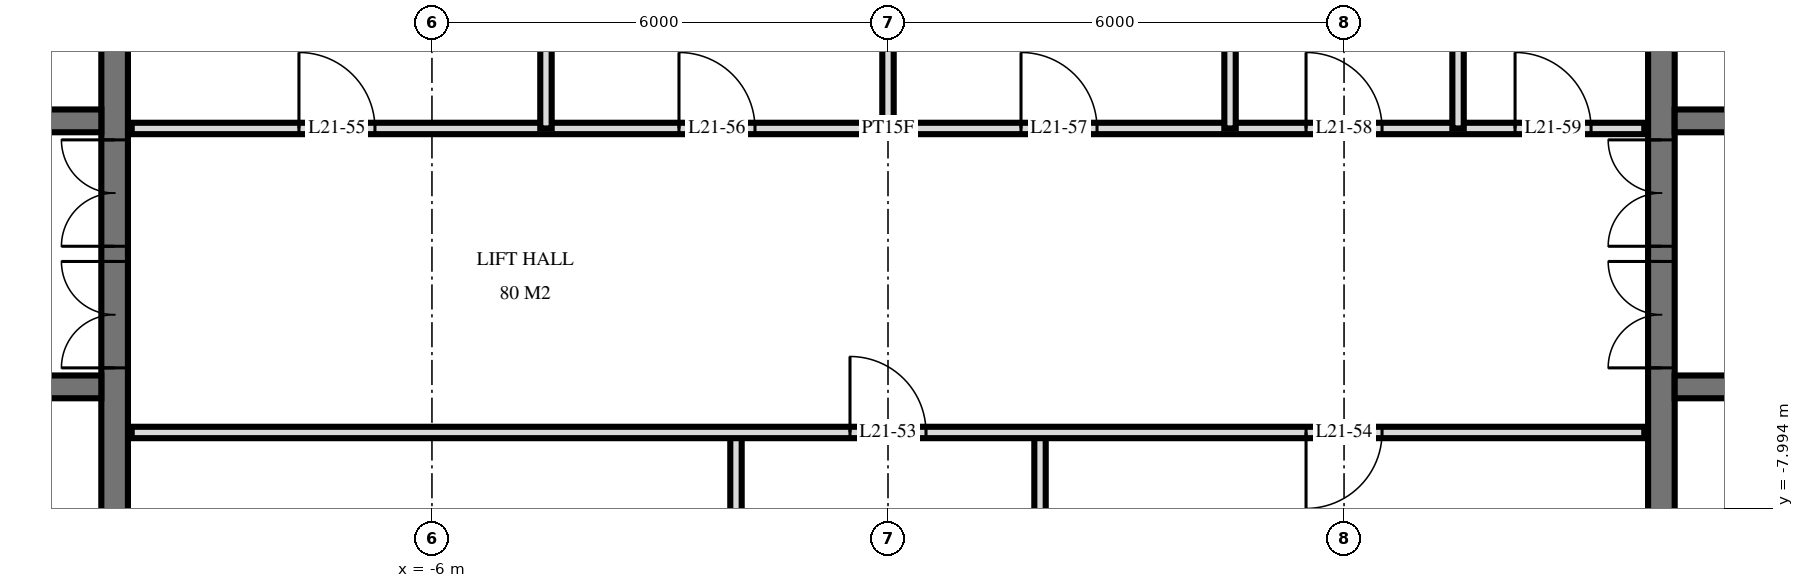
"""IFC4 building model, lengths in metres.
Left out: names, types, materials, properties, quantities, classifications, styles, units other than length and angle.
Written with IfcOpenShell. Run it as: python <this file> out.ifc"""

import sys

from ifc_helpers import new_model, si_unit, direction, frame, frame_2d, origin, place, context, subcontext, project, spatial, rectangle, extrude, element, fill, save


model = new_model("IFC4")
c1 = context("Model", 3, precision=1e-05, world=origin(), true_north=direction((0.0, 1.0)))
c2 = subcontext(c1, "Body", "Model", "MODEL_VIEW")
j1 = project(units=[si_unit("LENGTHUNIT", "METRE"), si_unit("PLANEANGLEUNIT", "RADIAN")], contexts=[c1])
p1 = place(None, origin())
s1 = spatial("IfcSite", under=j1, at=p1, CompositionType="ELEMENT")
p2 = place(p1, origin())
s2 = spatial("IfcBuilding", under=s1, at=p2, CompositionType="ELEMENT")
p3 = place(p2, frame((0.0, 0.0, 85.2)))
s3 = spatial("IfcBuildingStorey", under=s2, at=p3, CompositionType="ELEMENT", Elevation=85.2)
p4 = place(p3, frame((-10.175, -14.55, 0.0), z_axis=(0.0, 0.0, 1.0), x_axis=(0.0, 1.0, 0.0)))
e1 = element("IfcWall", 1, at=p4, inside=s3, PredefinedType="SHEAR", context=c2, shape_type="SweptSolid", body=[
    extrude(rectangle(XDim=14.1, YDim=0.35, at=frame_2d((7.05, 0.0))), origin(), (0.0, 0.0, 1.0), 3.6),
])
p5 = place(p4, frame((8.4, 0.0, 0.0)))
e2 = element("IfcOpeningElement", 2, at=p5, cuts=e1, PredefinedType="OPENING", context=c2, shape_type="SweptSolid", body=[
    extrude(rectangle(XDim=1.4, YDim=2.4, at=frame_2d((0.7, 1.2))), frame((0.0, 0.185, 0.0), z_axis=(0.0, -1.0, 0.0), x_axis=(1.0, 0.0, 0.0)), (0.0, 0.0, 1.0), 0.37),
])
p6 = place(p4, frame((10.0, 0.0, 0.0)))
e3 = element("IfcOpeningElement", 3, at=p6, cuts=e1, PredefinedType="OPENING", context=c2, shape_type="SweptSolid", body=[
    extrude(rectangle(XDim=1.4, YDim=2.4, at=frame_2d((0.7, 1.2))), frame((0.0, 0.185, 0.0), z_axis=(0.0, -1.0, 0.0), x_axis=(1.0, 0.0, 0.0)), (0.0, 0.0, 1.0), 0.37),
])
p7 = place(p4, frame((4.0, 0.0, 0.0)))
e4 = element("IfcOpeningElement", 4, at=p7, cuts=e1, PredefinedType="OPENING", context=c2, shape_type="SweptSolid", body=[
    extrude(rectangle(XDim=1.2, YDim=2.1, at=frame_2d((0.6, 1.05))), frame((0.0, 0.185, 0.0), z_axis=(0.0, -1.0, 0.0), x_axis=(1.0, 0.0, 0.0)), (0.0, 0.0, 1.0), 0.37),
])
p8 = place(p3, frame((-29.05, -2.9, 0.0), z_axis=(0.0, 0.0, 1.0), x_axis=(1.0, 0.0, 0.0)))
e5 = element("IfcWall", 5, at=p8, inside=s3, PredefinedType="SHEAR", context=c2, shape_type="SweptSolid", body=[
    extrude(rectangle(XDim=18.7, YDim=0.3, at=frame_2d((9.35, 0.0))), origin(), (0.0, 0.0, 1.0), 3.6),
])
p9 = place(p8, frame((2.95, 0.0, 0.0)))
e6 = element("IfcOpeningElement", 6, at=p9, cuts=e5, PredefinedType="OPENING", context=c2, shape_type="SweptSolid", body=[
    extrude(rectangle(XDim=1.1, YDim=2.1, at=frame_2d((0.55, 1.05))), frame((0.0, 0.16, 0.0), z_axis=(0.0, -1.0, 0.0), x_axis=(1.0, 0.0, 0.0)), (0.0, 0.0, 1.0), 0.32),
])
p10 = place(p8, frame((0.55, 0.0, 0.0)))
e7 = element("IfcOpeningElement", 7, at=p10, cuts=e5, PredefinedType="OPENING", context=c2, shape_type="SweptSolid", body=[
    extrude(rectangle(XDim=1.1, YDim=2.1, at=frame_2d((0.55, 1.05))), frame((0.0, 0.16, 0.0), z_axis=(0.0, -1.0, 0.0), x_axis=(1.0, 0.0, 0.0)), (0.0, 0.0, 1.0), 0.32),
])
p11 = place(p8, frame((10.9, 0.0, 0.0)))
e8 = element("IfcOpeningElement", 8, at=p11, cuts=e5, PredefinedType="OPENING", context=c2, shape_type="SweptSolid", body=[
    extrude(rectangle(XDim=0.9, YDim=2.1, at=frame_2d((0.45, 1.05))), frame((0.0, 0.16, 0.0), z_axis=(0.0, -1.0, 0.0), x_axis=(1.0, 0.0, 0.0)), (0.0, 0.0, 1.0), 0.32),
])
p12 = place(p8, frame((16.85, 0.0, 0.0)))
e9 = element("IfcOpeningElement", 9, at=p12, cuts=e5, PredefinedType="OPENING", context=c2, shape_type="SweptSolid", body=[
    extrude(rectangle(XDim=1.0, YDim=2.1, at=frame_2d((0.5, 1.05))), frame((0.0, 0.16, 0.0), z_axis=(0.0, -1.0, 0.0), x_axis=(1.0, 0.0, 0.0)), (0.0, 0.0, 1.0), 0.32),
])
p13 = place(p8, frame((14.312, 0.0, 0.0)))
e10 = element("IfcOpeningElement", 10, at=p13, cuts=e5, PredefinedType="OPENING", context=c2, shape_type="SweptSolid", body=[
    extrude(rectangle(XDim=1.0, YDim=2.1, at=frame_2d((0.5, 1.05))), frame((0.0, 0.16, 0.0), z_axis=(0.0, -1.0, 0.0), x_axis=(1.0, 0.0, 0.0)), (0.0, 0.0, 1.0), 0.32),
])
p14 = place(p8, frame((12.887, 0.0, 0.0)))
e11 = element("IfcOpeningElement", 11, at=p14, cuts=e5, PredefinedType="OPENING", context=c2, shape_type="SweptSolid", body=[
    extrude(rectangle(XDim=1.0, YDim=2.1, at=frame_2d((0.5, 1.05))), frame((0.0, 0.16, 0.0), z_axis=(0.0, -1.0, 0.0), x_axis=(1.0, 0.0, 0.0)), (0.0, 0.0, 1.0), 0.32),
])
p15 = place(p8, frame((5.6, 0.0, 0.0)))
e12 = element("IfcOpeningElement", 12, at=p15, cuts=e5, PredefinedType="OPENING", context=c2, shape_type="SweptSolid", body=[
    extrude(rectangle(XDim=1.0, YDim=2.1, at=frame_2d((0.5, 1.05))), frame((0.0, 0.16, 0.0), z_axis=(0.0, -1.0, 0.0), x_axis=(1.0, 0.0, 0.0)), (0.0, 0.0, 1.0), 0.32),
])
p16 = place(p3, frame((-29.05, -6.4, 0.0), z_axis=(0.0, 0.0, 1.0), x_axis=(1.0, 0.0, 0.0)))
e13 = element("IfcWall", 13, at=p16, inside=s3, PredefinedType="SHEAR", context=c2, shape_type="SweptSolid", body=[
    extrude(rectangle(XDim=18.7, YDim=0.3, at=frame_2d((9.35, 0.0))), origin(), (0.0, 0.0, 1.0), 3.6),
])
p17 = place(p16, frame((2.95, 0.0, 0.0)))
e14 = element("IfcOpeningElement", 14, at=p17, cuts=e13, PredefinedType="OPENING", context=c2, shape_type="SweptSolid", body=[
    extrude(rectangle(XDim=1.1, YDim=2.1, at=frame_2d((0.55, 1.05))), frame((0.0, 0.16, 0.0), z_axis=(0.0, -1.0, 0.0), x_axis=(1.0, 0.0, 0.0)), (0.0, 0.0, 1.0), 0.32),
])
p18 = place(p16, frame((0.55, 0.0, 0.0)))
e15 = element("IfcOpeningElement", 15, at=p18, cuts=e13, PredefinedType="OPENING", context=c2, shape_type="SweptSolid", body=[
    extrude(rectangle(XDim=1.1, YDim=2.1, at=frame_2d((0.55, 1.05))), frame((0.0, 0.16, 0.0), z_axis=(0.0, -1.0, 0.0), x_axis=(1.0, 0.0, 0.0)), (0.0, 0.0, 1.0), 0.32),
])
p19 = place(p16, frame((10.8, 0.0, 0.0)))
e16 = element("IfcOpeningElement", 16, at=p19, cuts=e13, PredefinedType="OPENING", context=c2, shape_type="SweptSolid", body=[
    extrude(rectangle(XDim=1.1, YDim=2.1, at=frame_2d((0.55, 1.05))), frame((0.0, 0.16, 0.0), z_axis=(0.0, -1.0, 0.0), x_axis=(1.0, 0.0, 0.0)), (0.0, 0.0, 1.0), 0.32),
])
p20 = place(p16, frame((5.6, 0.0, 0.0)))
e17 = element("IfcOpeningElement", 17, at=p20, cuts=e13, PredefinedType="OPENING", context=c2, shape_type="SweptSolid", body=[
    extrude(rectangle(XDim=1.0, YDim=2.1, at=frame_2d((0.5, 1.05))), frame((0.0, 0.16, 0.0), z_axis=(0.0, -1.0, 0.0), x_axis=(1.0, 0.0, 0.0)), (0.0, 0.0, 1.0), 0.32),
])
p21 = place(p3, frame((10.175, -14.55, 0.0), z_axis=(0.0, 0.0, 1.0), x_axis=(0.0, 1.0, 0.0)))
e18 = element("IfcWall", 18, at=p21, inside=s3, PredefinedType="SHEAR", context=c2, shape_type="SweptSolid", body=[
    extrude(rectangle(XDim=14.1, YDim=0.35, at=frame_2d((7.05, 0.0))), origin(), (0.0, 0.0, 1.0), 3.6),
])
p22 = place(p21, frame((8.4, 0.0, 0.0)))
e19 = element("IfcOpeningElement", 19, at=p22, cuts=e18, PredefinedType="OPENING", context=c2, shape_type="SweptSolid", body=[
    extrude(rectangle(XDim=1.4, YDim=2.4, at=frame_2d((0.7, 1.2))), frame((0.0, 0.185, 0.0), z_axis=(0.0, -1.0, 0.0), x_axis=(1.0, 0.0, 0.0)), (0.0, 0.0, 1.0), 0.37),
])
p23 = place(p21, frame((10.0, 0.0, 0.0)))
e20 = element("IfcOpeningElement", 20, at=p23, cuts=e18, PredefinedType="OPENING", context=c2, shape_type="SweptSolid", body=[
    extrude(rectangle(XDim=1.4, YDim=2.4, at=frame_2d((0.7, 1.2))), frame((0.0, 0.185, 0.0), z_axis=(0.0, -1.0, 0.0), x_axis=(1.0, 0.0, 0.0)), (0.0, 0.0, 1.0), 0.37),
])
p24 = place(p21, frame((4.0, 0.0, 0.0)))
e21 = element("IfcOpeningElement", 21, at=p24, cuts=e18, PredefinedType="OPENING", context=c2, shape_type="SweptSolid", body=[
    extrude(rectangle(XDim=1.2, YDim=2.1, at=frame_2d((0.6, 1.05))), frame((0.0, 0.185, 0.0), z_axis=(0.0, -1.0, 0.0), x_axis=(1.0, 0.0, 0.0)), (0.0, 0.0, 1.0), 0.37),
])
p25 = place(p3, frame((10.35, -2.9, 0.0), z_axis=(0.0, 0.0, 1.0), x_axis=(1.0, 0.0, 0.0)))
e22 = element("IfcWall", 22, at=p25, inside=s3, PredefinedType="SHEAR", context=c2, shape_type="SweptSolid", body=[
    extrude(rectangle(XDim=18.7, YDim=0.3, at=frame_2d((9.35, 0.0))), origin(), (0.0, 0.0, 1.0), 3.6),
])
p26 = place(p25, frame((14.65, 0.0, 0.0)))
e23 = element("IfcOpeningElement", 23, at=p26, cuts=e22, PredefinedType="OPENING", context=c2, shape_type="SweptSolid", body=[
    extrude(rectangle(XDim=1.1, YDim=2.1, at=frame_2d((0.55, 1.05))), frame((0.0, 0.16, 0.0), z_axis=(0.0, -1.0, 0.0), x_axis=(1.0, 0.0, 0.0)), (0.0, 0.0, 1.0), 0.32),
])
p27 = place(p25, frame((17.05, 0.0, 0.0)))
e24 = element("IfcOpeningElement", 24, at=p27, cuts=e22, PredefinedType="OPENING", context=c2, shape_type="SweptSolid", body=[
    extrude(rectangle(XDim=1.1, YDim=2.1, at=frame_2d((0.55, 1.05))), frame((0.0, 0.16, 0.0), z_axis=(0.0, -1.0, 0.0), x_axis=(1.0, 0.0, 0.0)), (0.0, 0.0, 1.0), 0.32),
])
p28 = place(p25, frame((6.9, 0.0, 0.0)))
e25 = element("IfcOpeningElement", 25, at=p28, cuts=e22, PredefinedType="OPENING", context=c2, shape_type="SweptSolid", body=[
    extrude(rectangle(XDim=0.9, YDim=2.1, at=frame_2d((0.45, 1.05))), frame((0.0, 0.16, 0.0), z_axis=(0.0, -1.0, 0.0), x_axis=(1.0, 0.0, 0.0)), (0.0, 0.0, 1.0), 0.32),
])
p29 = place(p25, frame((0.85, 0.0, 0.0)))
e26 = element("IfcOpeningElement", 26, at=p29, cuts=e22, PredefinedType="OPENING", context=c2, shape_type="SweptSolid", body=[
    extrude(rectangle(XDim=1.0, YDim=2.1, at=frame_2d((0.5, 1.05))), frame((0.0, 0.16, 0.0), z_axis=(0.0, -1.0, 0.0), x_axis=(1.0, 0.0, 0.0)), (0.0, 0.0, 1.0), 0.32),
])
p30 = place(p25, frame((3.387, 0.0, 0.0)))
e27 = element("IfcOpeningElement", 27, at=p30, cuts=e22, PredefinedType="OPENING", context=c2, shape_type="SweptSolid", body=[
    extrude(rectangle(XDim=1.0, YDim=2.1, at=frame_2d((0.5, 1.05))), frame((0.0, 0.16, 0.0), z_axis=(0.0, -1.0, 0.0), x_axis=(1.0, 0.0, 0.0)), (0.0, 0.0, 1.0), 0.32),
])
p31 = place(p25, frame((4.812, 0.0, 0.0)))
e28 = element("IfcOpeningElement", 28, at=p31, cuts=e22, PredefinedType="OPENING", context=c2, shape_type="SweptSolid", body=[
    extrude(rectangle(XDim=1.0, YDim=2.1, at=frame_2d((0.5, 1.05))), frame((0.0, 0.16, 0.0), z_axis=(0.0, -1.0, 0.0), x_axis=(1.0, 0.0, 0.0)), (0.0, 0.0, 1.0), 0.32),
])
p32 = place(p25, frame((12.1, 0.0, 0.0)))
e29 = element("IfcOpeningElement", 29, at=p32, cuts=e22, PredefinedType="OPENING", context=c2, shape_type="SweptSolid", body=[
    extrude(rectangle(XDim=1.0, YDim=2.1, at=frame_2d((0.5, 1.05))), frame((0.0, 0.16, 0.0), z_axis=(0.0, -1.0, 0.0), x_axis=(1.0, 0.0, 0.0)), (0.0, 0.0, 1.0), 0.32),
])
p33 = place(p3, frame((10.35, -6.4, 0.0), z_axis=(0.0, 0.0, 1.0), x_axis=(1.0, 0.0, 0.0)))
e30 = element("IfcWall", 30, at=p33, inside=s3, PredefinedType="SHEAR", context=c2, shape_type="SweptSolid", body=[
    extrude(rectangle(XDim=18.7, YDim=0.3, at=frame_2d((9.35, 0.0))), origin(), (0.0, 0.0, 1.0), 3.6),
])
p34 = place(p33, frame((14.65, 0.0, 0.0)))
e31 = element("IfcOpeningElement", 31, at=p34, cuts=e30, PredefinedType="OPENING", context=c2, shape_type="SweptSolid", body=[
    extrude(rectangle(XDim=1.1, YDim=2.1, at=frame_2d((0.55, 1.05))), frame((0.0, 0.16, 0.0), z_axis=(0.0, -1.0, 0.0), x_axis=(1.0, 0.0, 0.0)), (0.0, 0.0, 1.0), 0.32),
])
p35 = place(p33, frame((17.05, 0.0, 0.0)))
e32 = element("IfcOpeningElement", 32, at=p35, cuts=e30, PredefinedType="OPENING", context=c2, shape_type="SweptSolid", body=[
    extrude(rectangle(XDim=1.1, YDim=2.1, at=frame_2d((0.55, 1.05))), frame((0.0, 0.16, 0.0), z_axis=(0.0, -1.0, 0.0), x_axis=(1.0, 0.0, 0.0)), (0.0, 0.0, 1.0), 0.32),
])
p36 = place(p33, frame((6.8, 0.0, 0.0)))
e33 = element("IfcOpeningElement", 33, at=p36, cuts=e30, PredefinedType="OPENING", context=c2, shape_type="SweptSolid", body=[
    extrude(rectangle(XDim=1.1, YDim=2.1, at=frame_2d((0.55, 1.05))), frame((0.0, 0.16, 0.0), z_axis=(0.0, -1.0, 0.0), x_axis=(1.0, 0.0, 0.0)), (0.0, 0.0, 1.0), 0.32),
])
p37 = place(p33, frame((12.1, 0.0, 0.0)))
e34 = element("IfcOpeningElement", 34, at=p37, cuts=e30, PredefinedType="OPENING", context=c2, shape_type="SweptSolid", body=[
    extrude(rectangle(XDim=1.0, YDim=2.1, at=frame_2d((0.5, 1.05))), frame((0.0, 0.16, 0.0), z_axis=(0.0, -1.0, 0.0), x_axis=(1.0, 0.0, 0.0)), (0.0, 0.0, 1.0), 0.32),
])
for number, where, z_axis, x_axis in (
    (35, (7.5, -3.0, 0.0), (0.0, 0.0, 1.0), (0.0, 1.0, 0.0)),
    (36, (4.5, -3.0, 0.0), (0.0, 0.0, 1.0), (0.0, 1.0, 0.0)),
):
    element("IfcWall", number, at=place(p3, frame(where, z_axis=z_axis, x_axis=x_axis)), inside=s3, PredefinedType="PLUMBINGWALL", context=c2, shape_type="SweptSolid", body=[
        extrude(rectangle(XDim=4.02, YDim=0.15, at=frame_2d((2.01, 0.0))), origin(), (0.0, 0.0, 1.0), 3.32),
    ])
p38 = place(p3, frame((2.0, -11.0, 0.0), z_axis=(0.0, 0.0, 1.0), x_axis=(0.0, 1.0, 0.0)))
e37 = element("IfcWall", 37, at=p38, inside=s3, PredefinedType="PARTITIONING", context=c2, shape_type="SweptSolid", body=[
    extrude(rectangle(XDim=4.0, YDim=0.15, at=frame_2d((2.0, 0.0))), origin(), (0.0, 0.0, 1.0), 3.32),
])
p39 = place(p3, frame((0.0, -3.0, 0.0), z_axis=(0.0, 0.0, 1.0), x_axis=(0.0, 1.0, 0.0)))
e38 = element("IfcWall", 38, at=p39, inside=s3, PredefinedType="PARTITIONING", context=c2, shape_type="SweptSolid", body=[
    extrude(rectangle(XDim=4.02, YDim=0.15, at=frame_2d((2.01, 0.0))), origin(), (0.0, 0.0, 1.0), 3.32),
])
p40 = place(p3, frame((-2.0, -11.0, 0.0), z_axis=(0.0, 0.0, 1.0), x_axis=(0.0, 1.0, 0.0)))
e39 = element("IfcWall", 39, at=p40, inside=s3, PredefinedType="PARTITIONING", context=c2, shape_type="SweptSolid", body=[
    extrude(rectangle(XDim=4.0, YDim=0.15, at=frame_2d((2.0, 0.0))), origin(), (0.0, 0.0, 1.0), 3.32),
])
p41 = place(p3, frame((-4.5, -3.0, 0.0), z_axis=(0.0, 0.0, 1.0), x_axis=(0.0, 1.0, 0.0)))
e40 = element("IfcWall", 40, at=p41, inside=s3, PredefinedType="PARTITIONING", context=c2, shape_type="SweptSolid", body=[
    extrude(rectangle(XDim=4.02, YDim=0.15, at=frame_2d((2.01, 0.0))), origin(), (0.0, 0.0, 1.0), 3.32),
])
p42 = place(p3, frame((-9.95, -7.0, 0.0), z_axis=(0.0, 0.0, 1.0), x_axis=(1.0, 0.0, 0.0)))
e41 = element("IfcWall", 41, at=p42, inside=s3, PredefinedType="PARTITIONING", context=c2, shape_type="SweptSolid", body=[
    extrude(rectangle(XDim=19.9, YDim=0.15, at=frame_2d((9.95, 0.0))), origin(), (0.0, 0.0, 1.0), 3.32),
])
p43 = place(p42, frame((9.45, 0.0, 0.0)))
e42 = element("IfcOpeningElement", 42, at=p43, cuts=e41, PredefinedType="OPENING", context=c2, shape_type="SweptSolid", body=[
    extrude(rectangle(XDim=1.0, YDim=2.1, at=frame_2d((0.5, 1.05))), frame((0.0, 0.085, 0.0), z_axis=(0.0, -1.0, 0.0), x_axis=(1.0, 0.0, 0.0)), (0.0, 0.0, 1.0), 0.17),
])
p44 = place(p42, frame((15.45, 0.0, 0.0)))
e43 = element("IfcOpeningElement", 43, at=p44, cuts=e41, PredefinedType="OPENING", context=c2, shape_type="SweptSolid", body=[
    extrude(rectangle(XDim=1.0, YDim=2.1, at=frame_2d((0.5, 1.05))), frame((0.0, 0.085, 0.0), z_axis=(0.0, -1.0, 0.0), x_axis=(1.0, 0.0, 0.0)), (0.0, 0.0, 1.0), 0.17),
])
p45 = place(p3, frame((-9.95, -3.0, 0.0), z_axis=(0.0, 0.0, 1.0), x_axis=(1.0, 0.0, 0.0)))
e44 = element("IfcWall", 44, at=p45, inside=s3, PredefinedType="PARTITIONING", context=c2, shape_type="SweptSolid", body=[
    extrude(rectangle(XDim=19.9, YDim=0.15, at=frame_2d((9.95, 0.0))), origin(), (0.0, 0.0, 1.0), 3.32),
])
p46 = place(p45, frame((2.2, 0.0, 0.0)))
e45 = element("IfcOpeningElement", 45, at=p46, cuts=e44, PredefinedType="OPENING", context=c2, shape_type="SweptSolid", body=[
    extrude(rectangle(XDim=1.0, YDim=2.1, at=frame_2d((0.5, 1.05))), frame((0.0, 0.085, 0.0), z_axis=(0.0, -1.0, 0.0), x_axis=(1.0, 0.0, 0.0)), (0.0, 0.0, 1.0), 0.17),
])
p47 = place(p45, frame((7.2, 0.0, 0.0)))
e46 = element("IfcOpeningElement", 46, at=p47, cuts=e44, PredefinedType="OPENING", context=c2, shape_type="SweptSolid", body=[
    extrude(rectangle(XDim=1.0, YDim=2.1, at=frame_2d((0.5, 1.05))), frame((0.0, 0.085, 0.0), z_axis=(0.0, -1.0, 0.0), x_axis=(1.0, 0.0, 0.0)), (0.0, 0.0, 1.0), 0.17),
])
p48 = place(p45, frame((11.7, 0.0, 0.0)))
e47 = element("IfcOpeningElement", 47, at=p48, cuts=e44, PredefinedType="OPENING", context=c2, shape_type="SweptSolid", body=[
    extrude(rectangle(XDim=1.0, YDim=2.1, at=frame_2d((0.5, 1.05))), frame((0.0, 0.085, 0.0), z_axis=(0.0, -1.0, 0.0), x_axis=(1.0, 0.0, 0.0)), (0.0, 0.0, 1.0), 0.17),
])
p49 = place(p45, frame((15.45, 0.0, 0.0)))
e48 = element("IfcOpeningElement", 48, at=p49, cuts=e44, PredefinedType="OPENING", context=c2, shape_type="SweptSolid", body=[
    extrude(rectangle(XDim=1.0, YDim=2.1, at=frame_2d((0.5, 1.05))), frame((0.0, 0.085, 0.0), z_axis=(0.0, -1.0, 0.0), x_axis=(1.0, 0.0, 0.0)), (0.0, 0.0, 1.0), 0.17),
])
p50 = place(p45, frame((18.2, 0.0, 0.0)))
e49 = element("IfcOpeningElement", 49, at=p50, cuts=e44, PredefinedType="OPENING", context=c2, shape_type="SweptSolid", body=[
    extrude(rectangle(XDim=1.0, YDim=2.1, at=frame_2d((0.5, 1.05))), frame((0.0, 0.085, 0.0), z_axis=(0.0, -1.0, 0.0), x_axis=(1.0, 0.0, 0.0)), (0.0, 0.0, 1.0), 0.17),
])
p51 = place(p5, origin())
e50 = element("IfcDoor", 50, at=p51, inside=s3, OperationType="DOUBLE_DOOR_SINGLE_SWING", PredefinedType="DOOR", context=c2, shape_type="SweptSolid", body=[
    extrude(rectangle(XDim=1.4, YDim=2.4, at=frame_2d((0.7, 1.2))), frame((0.0, 0.025, 0.0), z_axis=(0.0, -1.0, 0.0), x_axis=(1.0, 0.0, 0.0)), (0.0, 0.0, 1.0), 0.05),
])
fill(e2, e50)
p52 = place(p6, origin())
e51 = element("IfcDoor", 51, at=p52, inside=s3, OperationType="DOUBLE_DOOR_SINGLE_SWING", PredefinedType="DOOR", context=c2, shape_type="SweptSolid", body=[
    extrude(rectangle(XDim=1.4, YDim=2.4, at=frame_2d((0.7, 1.2))), frame((0.0, 0.025, 0.0), z_axis=(0.0, -1.0, 0.0), x_axis=(1.0, 0.0, 0.0)), (0.0, 0.0, 1.0), 0.05),
])
fill(e3, e51)
p53 = place(p22, origin())
e52 = element("IfcDoor", 52, at=p53, inside=s3, OperationType="DOUBLE_DOOR_SINGLE_SWING", PredefinedType="DOOR", context=c2, shape_type="SweptSolid", body=[
    extrude(rectangle(XDim=1.4, YDim=2.4, at=frame_2d((0.7, 1.2))), frame((0.0, 0.025, 0.0), z_axis=(0.0, -1.0, 0.0), x_axis=(1.0, 0.0, 0.0)), (0.0, 0.0, 1.0), 0.05),
])
fill(e19, e52)
p54 = place(p23, origin())
e53 = element("IfcDoor", 53, at=p54, inside=s3, OperationType="DOUBLE_DOOR_SINGLE_SWING", PredefinedType="DOOR", context=c2, shape_type="SweptSolid", body=[
    extrude(rectangle(XDim=1.4, YDim=2.4, at=frame_2d((0.7, 1.2))), frame((0.0, 0.025, 0.0), z_axis=(0.0, -1.0, 0.0), x_axis=(1.0, 0.0, 0.0)), (0.0, 0.0, 1.0), 0.05),
])
fill(e20, e53)
p55 = place(p43, origin())
e54 = element("IfcDoor", 54, at=p55, inside=s3, OperationType="SINGLE_SWING_RIGHT", PredefinedType="DOOR", context=c2, shape_type="SweptSolid", body=[
    extrude(rectangle(XDim=1.0, YDim=2.1, at=frame_2d((0.5, 1.05))), frame((0.0, 0.025, 0.0), z_axis=(0.0, -1.0, 0.0), x_axis=(1.0, 0.0, 0.0)), (0.0, 0.0, 1.0), 0.05),
])
fill(e42, e54)
p56 = place(p44, frame((0.5, 0.0, 0.0), z_axis=(0.0, 0.0, 1.0), x_axis=(-1.0, 0.0, 0.0)))
e55 = element("IfcDoor", 55, at=p56, inside=s3, OperationType="SINGLE_SWING_LEFT", PredefinedType="DOOR", context=c2, shape_type="SweptSolid", body=[
    extrude(rectangle(XDim=1.0, YDim=2.1, at=frame_2d((0.0, 1.05))), frame((0.0, -0.025, 0.0), z_axis=(0.0, 1.0, 0.0), x_axis=(-1.0, 0.0, 0.0)), (0.0, 0.0, 1.0), 0.05),
])
fill(e43, e55)
p57 = place(p46, origin())
e56 = element("IfcDoor", 56, at=p57, inside=s3, OperationType="SINGLE_SWING_RIGHT", PredefinedType="DOOR", context=c2, shape_type="SweptSolid", body=[
    extrude(rectangle(XDim=1.0, YDim=2.1, at=frame_2d((0.5, 1.05))), frame((0.0, 0.025, 0.0), z_axis=(0.0, -1.0, 0.0), x_axis=(1.0, 0.0, 0.0)), (0.0, 0.0, 1.0), 0.05),
])
fill(e45, e56)
p58 = place(p47, origin())
e57 = element("IfcDoor", 57, at=p58, inside=s3, OperationType="SINGLE_SWING_RIGHT", PredefinedType="DOOR", context=c2, shape_type="SweptSolid", body=[
    extrude(rectangle(XDim=1.0, YDim=2.1, at=frame_2d((0.5, 1.05))), frame((0.0, 0.025, 0.0), z_axis=(0.0, -1.0, 0.0), x_axis=(1.0, 0.0, 0.0)), (0.0, 0.0, 1.0), 0.05),
])
fill(e46, e57)
p59 = place(p48, origin())
e58 = element("IfcDoor", 58, at=p59, inside=s3, OperationType="SINGLE_SWING_RIGHT", PredefinedType="DOOR", context=c2, shape_type="SweptSolid", body=[
    extrude(rectangle(XDim=1.0, YDim=2.1, at=frame_2d((0.5, 1.05))), frame((0.0, 0.025, 0.0), z_axis=(0.0, -1.0, 0.0), x_axis=(1.0, 0.0, 0.0)), (0.0, 0.0, 1.0), 0.05),
])
fill(e47, e58)
p60 = place(p49, origin())
e59 = element("IfcDoor", 59, at=p60, inside=s3, OperationType="SINGLE_SWING_RIGHT", PredefinedType="DOOR", context=c2, shape_type="SweptSolid", body=[
    extrude(rectangle(XDim=1.0, YDim=2.1, at=frame_2d((0.5, 1.05))), frame((0.0, 0.025, 0.0), z_axis=(0.0, -1.0, 0.0), x_axis=(1.0, 0.0, 0.0)), (0.0, 0.0, 1.0), 0.05),
])
fill(e48, e59)
p61 = place(p50, origin())
e60 = element("IfcDoor", 60, at=p61, inside=s3, OperationType="SINGLE_SWING_RIGHT", PredefinedType="DOOR", context=c2, shape_type="SweptSolid", body=[
    extrude(rectangle(XDim=1.0, YDim=2.1, at=frame_2d((0.5, 1.05))), frame((0.0, 0.025, 0.0), z_axis=(0.0, -1.0, 0.0), x_axis=(1.0, 0.0, 0.0)), (0.0, 0.0, 1.0), 0.05),
])
fill(e49, e60)
save(model, sys.argv[1])
